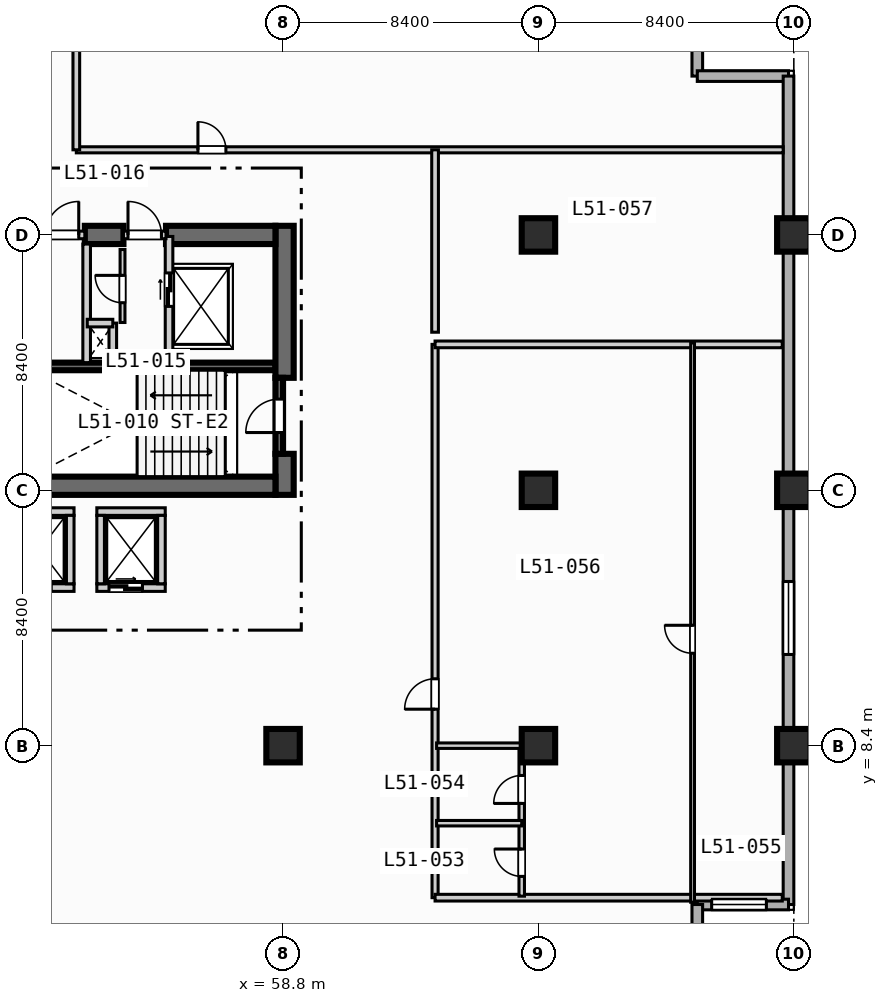
"""IFC4 building model, lengths in metres.
Left out: names, types, materials, properties, quantities, classifications, styles, units other than length and angle.
Written with IfcOpenShell. Run it as: python <this file> out.ifc"""

import sys

from ifc_helpers import new_model, si_unit, direction, frame, frame_2d, origin, origin_2d, place, context, subcontext, project, spatial, rectangle, extrude, element, fill, save


model = new_model("IFC4")
c1 = context("Model", 3, precision=1e-05, world=origin(), true_north=direction((0.0, 1.0)))
c2 = subcontext(c1, "Body", "Model", "MODEL_VIEW")
j1 = project(units=[si_unit("LENGTHUNIT", "METRE"), si_unit("PLANEANGLEUNIT", "RADIAN")], contexts=[c1])
p1 = place(None, origin())
s1 = spatial("IfcSite", under=j1, at=p1, CompositionType="ELEMENT")
p2 = place(p1, origin())
s2 = spatial("IfcBuilding", under=s1, at=p2, CompositionType="ELEMENT")
p3 = place(p2, frame((0.0, 0.0, 208.7)))
s3 = spatial("IfcBuildingStorey", under=s2, at=p3, CompositionType="ELEMENT", Elevation=208.7)
p4 = place(p3, frame((50.5, 20.875, 0.0), z_axis=(0.0, 0.0, 1.0), x_axis=(1.0, 0.0, 0.0)))
e1 = element("IfcWall", 1, at=p4, inside=s3, PredefinedType="SOLIDWALL", context=c2, shape_type="SweptSolid", body=[
    extrude(rectangle(XDim=8.05, YDim=0.25, at=frame_2d((4.025, 0.0))), origin(), (0.0, 0.0, 1.0), 3.47),
])
p5 = place(p3, frame((58.85, 16.65, 0.0), z_axis=(0.0, 0.0, 1.0), x_axis=(0.0, 1.0, 0.0)))
e2 = element("IfcWall", 2, at=p5, inside=s3, PredefinedType="SHEAR", context=c2, shape_type="SweptSolid", body=[
    extrude(rectangle(XDim=1.35, YDim=0.6, at=frame_2d((0.675, 0.0))), origin(), (0.0, 0.0, 1.0), 3.47),
])
p6 = place(p3, frame((58.85, 20.5, 0.0), z_axis=(0.0, 0.0, 1.0), x_axis=(0.0, 1.0, 0.0)))
e3 = element("IfcWall", 3, at=p6, inside=s3, PredefinedType="SHEAR", context=c2, shape_type="SweptSolid", body=[
    extrude(rectangle(XDim=5.0, YDim=0.6, at=frame_2d((2.5, 0.0))), origin(), (0.0, 0.0, 1.0), 3.47),
])
p7 = place(p3, frame((42.2, 16.95, 0.0), z_axis=(0.0, 0.0, 1.0), x_axis=(1.0, 0.0, 0.0)))
e4 = element("IfcWall", 4, at=p7, inside=s3, PredefinedType="SHEAR", context=c2, shape_type="SweptSolid", body=[
    extrude(rectangle(XDim=16.35, YDim=0.6, at=frame_2d((8.175, 0.0))), origin(), (0.0, 0.0, 1.0), 3.47),
])
p8 = place(p3, frame((52.28, 25.2, 0.0), z_axis=(0.0, 0.0, 1.0), x_axis=(1.0, 0.0, 0.0)))
e5 = element("IfcWall", 5, at=p8, inside=s3, PredefinedType="SHEAR", context=c2, shape_type="SweptSolid", body=[
    extrude(rectangle(XDim=1.27, YDim=0.6, at=frame_2d((0.635, 0.0))), origin(), (0.0, 0.0, 1.0), 3.47),
])
p9 = place(p3, frame((54.95, 25.2, 0.0), z_axis=(0.0, 0.0, 1.0), x_axis=(1.0, 0.0, 0.0)))
e6 = element("IfcWall", 6, at=p9, inside=s3, PredefinedType="SHEAR", context=c2, shape_type="SweptSolid", body=[
    extrude(rectangle(XDim=3.6, YDim=0.6, at=frame_2d((1.8, 0.0))), origin(), (0.0, 0.0, 1.0), 3.47),
])
for number, where, z_axis, x_axis in (
    (7, (58.8, 8.4, 0.0), (0.0, 0.0, 1.0), (1.0, 0.0, 0.0)),
    (8, (67.2, 8.4, 0.0), (0.0, 0.0, 1.0), (1.0, 0.0, 0.0)),
    (9, (67.2, 16.8, 0.0), (0.0, 0.0, 1.0), (1.0, 0.0, 0.0)),
    (10, (67.2, 25.2, 0.0), (0.0, 0.0, 1.0), (1.0, 0.0, 0.0)),
    (11, (75.6, 8.4, 0.0), (0.0, 0.0, 1.0), (1.0, 0.0, 0.0)),
    (12, (75.6, 16.8, 0.0), (0.0, 0.0, 1.0), (1.0, 0.0, 0.0)),
    (13, (75.6, 25.2, 0.0), (0.0, 0.0, 1.0), (1.0, 0.0, 0.0)),
):
    element("IfcColumn", number, at=place(p3, frame(where, z_axis=z_axis, x_axis=x_axis)), inside=s3, PredefinedType="COLUMN", context=c2, shape_type="SweptSolid", body=[
        extrude(rectangle(XDim=1.1, YDim=1.1, at=origin_2d()), origin(), (0.0, 0.0, 1.0), 3.7),
    ])
for number, where, z_axis, x_axis in (
    (14, (72.425, 33.425, 0.0), (0.0, 0.0, 1.0), (0.0, -1.0, 0.0)),
    (15, (72.425, 30.425, 0.0), (0.0, 0.0, 1.0), (1.0, 0.0, 0.0)),
):
    element("IfcWall", number, at=place(p3, frame(where, z_axis=z_axis, x_axis=x_axis)), inside=s3, PredefinedType="STANDARD", context=c2, shape_type="SweptSolid", body=[
        extrude(rectangle(XDim=3.0, YDim=0.35, at=frame_2d((1.5, 0.0))), origin(), (0.0, 0.0, 1.0), 3.47),
    ])
p10 = place(p3, frame((75.425, 30.425, 0.0), z_axis=(0.0, 0.0, 1.0), x_axis=(0.0, -1.0, 0.0)))
e16 = element("IfcWall", 16, at=p10, inside=s3, PredefinedType="STANDARD", context=c2, shape_type="SweptSolid", body=[
    extrude(rectangle(XDim=27.25, YDim=0.35, at=frame_2d((13.625, 0.0))), origin(), (0.0, 0.0, 1.0), 3.47),
])
p11 = place(p10, frame((16.625, 0.0, 0.85)))
e17 = element("IfcOpeningElement", 17, at=p11, cuts=e16, PredefinedType="OPENING", context=c2, shape_type="SweptSolid", body=[
    extrude(rectangle(XDim=2.4, YDim=1.95, at=frame_2d((1.2, 0.975))), frame((0.0, 0.185, 0.0), z_axis=(0.0, -1.0, 0.0), x_axis=(1.0, 0.0, 0.0)), (0.0, 0.0, 1.0), 0.37),
])
p12 = place(p3, frame((75.425, 3.175, 0.0), z_axis=(0.0, 0.0, 1.0), x_axis=(-1.0, 0.0, 0.0)))
e18 = element("IfcWall", 18, at=p12, inside=s3, PredefinedType="STANDARD", context=c2, shape_type="SweptSolid", body=[
    extrude(rectangle(XDim=3.0, YDim=0.35, at=frame_2d((1.5, 0.0))), origin(), (0.0, 0.0, 1.0), 3.47),
])
p13 = place(p12, frame((0.728, 0.0, 0.85)))
e19 = element("IfcOpeningElement", 19, at=p13, cuts=e18, PredefinedType="OPENING", context=c2, shape_type="SweptSolid", body=[
    extrude(rectangle(XDim=1.8, YDim=1.8, at=frame_2d((0.9, 0.9))), frame((0.0, 0.185, 0.0), z_axis=(0.0, -1.0, 0.0), x_axis=(1.0, 0.0, 0.0)), (0.0, 0.0, 1.0), 0.37),
])
p14 = place(p3, frame((72.425, 3.175, 0.0), z_axis=(0.0, 0.0, 1.0), x_axis=(0.0, -1.0, 0.0)))
e20 = element("IfcWall", 20, at=p14, inside=s3, PredefinedType="STANDARD", context=c2, shape_type="SweptSolid", body=[
    extrude(rectangle(XDim=3.0, YDim=0.35, at=frame_2d((1.5, 0.0))), origin(), (0.0, 0.0, 1.0), 3.47),
])
p15 = place(p3, frame((58.675, 18.0, 0.0), z_axis=(0.0, 0.0, 1.0), x_axis=(0.0, 1.0, 0.0)))
e21 = element("IfcWall", 21, at=p15, inside=s3, PredefinedType="SOLIDWALL", context=c2, shape_type="SweptSolid", body=[
    extrude(rectangle(XDim=2.5, YDim=0.25, at=frame_2d((1.25, 0.0))), origin(), (0.0, 0.0, 1.0), 3.47),
])
p16 = place(p15, frame((0.7, 0.0, 0.0)))
e22 = element("IfcOpeningElement", 22, at=p16, cuts=e21, PredefinedType="OPENING", context=c2, shape_type="SweptSolid", body=[
    extrude(rectangle(XDim=1.1, YDim=2.15, at=frame_2d((0.55, 1.075))), frame((0.0, 0.135, 0.0), z_axis=(0.0, -1.0, 0.0), x_axis=(1.0, 0.0, 0.0)), (0.0, 0.0, 1.0), 0.27),
])
p17 = place(p3, frame((50.8, 25.2, 0.0), z_axis=(0.0, 0.0, 1.0), x_axis=(1.0, 0.0, 0.0)))
e23 = element("IfcWall", 23, at=p17, inside=s3, PredefinedType="SOLIDWALL", context=c2, shape_type="SweptSolid", body=[
    extrude(rectangle(XDim=1.48, YDim=0.25, at=frame_2d((0.74, 0.0))), origin(), (0.0, 0.0, 1.0), 3.47),
])
p18 = place(p17, frame((0.18, 0.0, 0.0)))
e24 = element("IfcOpeningElement", 24, at=p18, cuts=e23, PredefinedType="OPENING", context=c2, shape_type="SweptSolid", body=[
    extrude(rectangle(XDim=1.1, YDim=2.15, at=frame_2d((0.55, 1.075))), frame((0.0, 0.135, 0.0), z_axis=(0.0, -1.0, 0.0), x_axis=(1.0, 0.0, 0.0)), (0.0, 0.0, 1.0), 0.27),
])
p19 = place(p3, frame((52.34, 21.0, 0.0), z_axis=(0.0, 0.0, 1.0), x_axis=(0.0, 1.0, 0.0)))
e25 = element("IfcWall", 25, at=p19, inside=s3, PredefinedType="SOLIDWALL", context=c2, shape_type="SweptSolid", body=[
    extrude(rectangle(XDim=3.9, YDim=0.25, at=frame_2d((1.95, 0.0))), origin(), (0.0, 0.0, 1.0), 3.47),
])
p20 = place(p3, frame((55.05, 21.0, 0.0), z_axis=(0.0, 0.0, 1.0), x_axis=(0.0, 1.0, 0.0)))
e26 = element("IfcWall", 26, at=p20, inside=s3, PredefinedType="SOLIDWALL", context=c2, shape_type="SweptSolid", body=[
    extrude(rectangle(XDim=4.15, YDim=0.25, at=frame_2d((2.075, 0.0))), origin(), (0.0, 0.0, 1.0), 3.47),
])
p21 = place(p20, frame((1.85, 0.0, 0.0)))
e27 = element("IfcOpeningElement", 27, at=p21, cuts=e26, PredefinedType="OPENING", context=c2, shape_type="SweptSolid", body=[
    extrude(rectangle(XDim=1.1, YDim=2.15, at=frame_2d((0.55, 1.075))), frame((0.0, 0.135, 0.0), z_axis=(0.0, -1.0, 0.0), x_axis=(1.0, 0.0, 0.0)), (0.0, 0.0, 1.0), 0.27),
])
p22 = place(p3, frame((53.55, 25.2, 0.0), z_axis=(0.0, 0.0, 1.0), x_axis=(1.0, 0.0, 0.0)))
e28 = element("IfcWall", 28, at=p22, inside=s3, PredefinedType="SOLIDWALL", context=c2, shape_type="SweptSolid", body=[
    extrude(rectangle(XDim=1.4, YDim=0.25, at=frame_2d((0.7, 0.0))), origin(), (0.0, 0.0, 1.0), 3.47),
])
p23 = place(p22, frame((0.15, 0.0, 0.0)))
e29 = element("IfcOpeningElement", 29, at=p23, cuts=e28, PredefinedType="OPENING", context=c2, shape_type="SweptSolid", body=[
    extrude(rectangle(XDim=1.1, YDim=2.15, at=frame_2d((0.55, 1.075))), frame((0.0, 0.135, 0.0), z_axis=(0.0, -1.0, 0.0), x_axis=(1.0, 0.0, 0.0)), (0.0, 0.0, 1.0), 0.27),
])
p24 = place(p3, frame((53.2, 21.0, 0.0), z_axis=(0.0, 0.0, 1.0), x_axis=(0.0, 1.0, 0.0)))
e30 = element("IfcWall", 30, at=p24, inside=s3, PredefinedType="SOLIDWALL", context=c2, shape_type="SweptSolid", body=[
    extrude(rectangle(XDim=1.3, YDim=0.25, at=frame_2d((0.65, 0.0))), origin(), (0.0, 0.0, 1.0), 3.47),
])
p25 = place(p3, frame((52.36, 22.3, 0.0), z_axis=(0.0, 0.0, 1.0), x_axis=(1.0, 0.0, 0.0)))
e31 = element("IfcWall", 31, at=p25, inside=s3, PredefinedType="SOLIDWALL", context=c2, shape_type="SweptSolid", body=[
    extrude(rectangle(XDim=0.84, YDim=0.25, at=frame_2d((0.42, 0.0))), origin(), (0.0, 0.0, 1.0), 3.47),
])
p26 = place(p3, frame((53.52, 22.32, 0.0), z_axis=(0.0, 0.0, 1.0), x_axis=(0.0, 1.0, 0.0)))
e32 = element("IfcWall", 32, at=p26, inside=s3, PredefinedType="PARTITIONING", context=c2, shape_type="SweptSolid", body=[
    extrude(rectangle(XDim=2.4, YDim=0.16, at=frame_2d((1.2, 0.0))), origin(), (0.0, 0.0, 1.0), 3.47),
])
p27 = place(p26, frame((0.65, 0.0, 0.0)))
e33 = element("IfcOpeningElement", 33, at=p27, cuts=e32, PredefinedType="OPENING", context=c2, shape_type="SweptSolid", body=[
    extrude(rectangle(XDim=0.9, YDim=2.1, at=frame_2d((0.45, 1.05))), frame((0.0, 0.09, 0.0), z_axis=(0.0, -1.0, 0.0), x_axis=(1.0, 0.0, 0.0)), (0.0, 0.0, 1.0), 0.18),
])
p28 = place(p3, frame((49.675, 13.6, 0.0), z_axis=(0.0, 0.0, 1.0), x_axis=(1.0, 0.0, 0.0)))
e34 = element("IfcWall", 34, at=p28, inside=s3, PredefinedType="SOLIDWALL", context=c2, shape_type="SweptSolid", body=[
    extrude(rectangle(XDim=2.25, YDim=0.25, at=frame_2d((1.125, 0.0))), origin(), (0.0, 0.0, 1.0), 3.47),
])
p29 = place(p28, frame((0.4, 0.0, 0.0)))
e35 = element("IfcOpeningElement", 35, at=p29, cuts=e34, PredefinedType="OPENING", context=c2, shape_type="SweptSolid", body=[
    extrude(rectangle(XDim=1.1, YDim=2.15, at=frame_2d((0.55, 1.075))), frame((0.0, 0.135, 0.0), z_axis=(0.0, -1.0, 0.0), x_axis=(1.0, 0.0, 0.0)), (0.0, 0.0, 1.0), 0.27),
])
for number, where, z_axis, x_axis in (
    (36, (49.675, 16.1, 0.0), (0.0, 0.0, 1.0), (1.0, 0.0, 0.0)),
    (37, (51.8, 13.725, 0.0), (0.0, 0.0, 1.0), (0.0, 1.0, 0.0)),
):
    element("IfcWall", number, at=place(p3, frame(where, z_axis=z_axis, x_axis=x_axis)), inside=s3, PredefinedType="SOLIDWALL", context=c2, shape_type="SweptSolid", body=[
        extrude(rectangle(XDim=2.25, YDim=0.25, at=frame_2d((1.125, 0.0))), origin(), (0.0, 0.0, 1.0), 3.47),
    ])
p30 = place(p3, frame((52.675, 13.6, 0.0), z_axis=(0.0, 0.0, 1.0), x_axis=(1.0, 0.0, 0.0)))
e38 = element("IfcWall", 38, at=p30, inside=s3, PredefinedType="SOLIDWALL", context=c2, shape_type="SweptSolid", body=[
    extrude(rectangle(XDim=2.25, YDim=0.25, at=frame_2d((1.125, 0.0))), origin(), (0.0, 0.0, 1.0), 3.47),
])
p31 = place(p30, frame((0.4, 0.0, 0.0)))
e39 = element("IfcOpeningElement", 39, at=p31, cuts=e38, PredefinedType="OPENING", context=c2, shape_type="SweptSolid", body=[
    extrude(rectangle(XDim=1.1, YDim=2.15, at=frame_2d((0.55, 1.075))), frame((0.0, 0.135, 0.0), z_axis=(0.0, -1.0, 0.0), x_axis=(1.0, 0.0, 0.0)), (0.0, 0.0, 1.0), 0.27),
])
for number, where, z_axis, x_axis in (
    (40, (52.675, 16.1, 0.0), (0.0, 0.0, 1.0), (1.0, 0.0, 0.0)),
    (41, (52.8, 13.725, 0.0), (0.0, 0.0, 1.0), (0.0, 1.0, 0.0)),
    (42, (54.8, 13.725, 0.0), (0.0, 0.0, 1.0), (0.0, 1.0, 0.0)),
):
    element("IfcWall", number, at=place(p3, frame(where, z_axis=z_axis, x_axis=x_axis)), inside=s3, PredefinedType="SOLIDWALL", context=c2, shape_type="SweptSolid", body=[
        extrude(rectangle(XDim=2.25, YDim=0.25, at=frame_2d((1.125, 0.0))), origin(), (0.0, 0.0, 1.0), 3.47),
    ])
p32 = place(p3, frame((63.8, 3.4, 0.0), z_axis=(0.0, 0.0, 1.0), x_axis=(0.0, 1.0, 0.0)))
e43 = element("IfcWall", 43, at=p32, inside=s3, PredefinedType="PARTITIONING", context=c2, shape_type="SweptSolid", body=[
    extrude(rectangle(XDim=18.2, YDim=0.2, at=frame_2d((9.1, 0.0))), origin(), (0.0, 0.0, 1.0), 3.47),
])
p33 = place(p32, frame((6.2, 0.0, 0.0)))
e44 = element("IfcOpeningElement", 44, at=p33, cuts=e43, PredefinedType="OPENING", context=c2, shape_type="SweptSolid", body=[
    extrude(rectangle(XDim=1.0, YDim=2.15, at=frame_2d((0.5, 1.075))), frame((0.0, 0.11, 0.0), z_axis=(0.0, -1.0, 0.0), x_axis=(1.0, 0.0, 0.0)), (0.0, 0.0, 1.0), 0.22),
])
for number, where, z_axis, x_axis in (
    (45, (63.8, 3.4, 0.0), (0.0, 0.0, 1.0), (1.0, 0.0, 0.0)),
    (46, (63.8, 21.6, 0.0), (0.0, 0.0, 1.0), (1.0, 0.0, 0.0)),
):
    element("IfcWall", number, at=place(p3, frame(where, z_axis=z_axis, x_axis=x_axis)), inside=s3, PredefinedType="PARTITIONING", context=c2, shape_type="SweptSolid", body=[
        extrude(rectangle(XDim=11.42, YDim=0.22, at=frame_2d((5.71, 0.0))), origin(), (0.0, 0.0, 1.0), 3.47),
    ])
p34 = place(p3, frame((66.65, 3.45, 0.0), z_axis=(0.0, 0.0, 1.0), x_axis=(0.0, 1.0, 0.0)))
e47 = element("IfcWall", 47, at=p34, inside=s3, PredefinedType="PLUMBINGWALL", context=c2, shape_type="SweptSolid", body=[
    extrude(rectangle(XDim=4.95, YDim=0.18, at=frame_2d((2.475, 0.0))), origin(), (0.0, 0.0, 1.0), 3.47),
])
p35 = place(p34, frame((0.65, 0.0, 0.0)))
e48 = element("IfcOpeningElement", 48, at=p35, cuts=e47, PredefinedType="OPENING", context=c2, shape_type="SweptSolid", body=[
    extrude(rectangle(XDim=0.9, YDim=2.1, at=frame_2d((0.45, 1.05))), frame((0.0, 0.1, 0.0), z_axis=(0.0, -1.0, 0.0), x_axis=(1.0, 0.0, 0.0)), (0.0, 0.0, 1.0), 0.2),
])
p36 = place(p34, frame((3.05, 0.0, 0.0)))
e49 = element("IfcOpeningElement", 49, at=p36, cuts=e47, PredefinedType="OPENING", context=c2, shape_type="SweptSolid", body=[
    extrude(rectangle(XDim=0.92, YDim=2.1, at=frame_2d((0.46, 1.05))), frame((0.0, 0.1, 0.0), z_axis=(0.0, -1.0, 0.0), x_axis=(1.0, 0.0, 0.0)), (0.0, 0.0, 1.0), 0.2),
])
p37 = place(p3, frame((63.85, 5.85, 0.0), z_axis=(0.0, 0.0, 1.0), x_axis=(1.0, 0.0, 0.0)))
e50 = element("IfcWall", 50, at=p37, inside=s3, PredefinedType="PLUMBINGWALL", context=c2, shape_type="SweptSolid", body=[
    extrude(rectangle(XDim=2.8, YDim=0.18, at=frame_2d((1.4, 0.0))), origin(), (0.0, 0.0, 1.0), 3.47),
])
p38 = place(p3, frame((63.85, 8.4, 0.0), z_axis=(0.0, 0.0, 1.0), x_axis=(1.0, 0.0, 0.0)))
e51 = element("IfcWall", 51, at=p38, inside=s3, PredefinedType="PLUMBINGWALL", context=c2, shape_type="SweptSolid", body=[
    extrude(rectangle(XDim=2.8, YDim=0.18, at=frame_2d((1.4, 0.0))), origin(), (0.0, 0.0, 1.0), 2.927),
])
p39 = place(p3, frame((72.27, 3.25, 0.0), z_axis=(0.0, 0.0, 1.0), x_axis=(0.0, 1.0, 0.0)))
e52 = element("IfcWall", 52, at=p39, inside=s3, PredefinedType="PARTITIONING", context=c2, shape_type="SweptSolid", body=[
    extrude(rectangle(XDim=18.4, YDim=0.125, at=frame_2d((9.2, 0.0))), origin(), (0.0, 0.0, 1.0), 3.47),
])
p40 = place(p39, frame((8.19, 0.0, 0.0)))
e53 = element("IfcOpeningElement", 53, at=p40, cuts=e52, PredefinedType="OPENING", context=c2, shape_type="SweptSolid", body=[
    extrude(rectangle(XDim=0.92, YDim=2.1, at=frame_2d((0.46, 1.05))), frame((0.0, 0.073, 0.0), z_axis=(0.0, -1.0, 0.0), x_axis=(1.0, 0.0, 0.0)), (0.0, 0.0, 1.0), 0.145),
])
p41 = place(p3, frame((52.0, 28.0, 0.0), z_axis=(0.0, 0.0, 1.0), x_axis=(1.0, 0.0, 0.0)))
e54 = element("IfcWall", 54, at=p41, inside=s3, PredefinedType="PARTITIONING", context=c2, shape_type="SweptSolid", body=[
    extrude(rectangle(XDim=23.25, YDim=0.2, at=frame_2d((11.625, 0.0))), origin(), (0.0, 0.0, 1.0), 3.47),
])
p42 = place(p41, frame((4.0, 0.0, 0.0)))
e55 = element("IfcOpeningElement", 55, at=p42, cuts=e54, PredefinedType="OPENING", context=c2, shape_type="SweptSolid", body=[
    extrude(rectangle(XDim=0.92, YDim=2.1, at=frame_2d((0.46, 1.05))), frame((0.0, 0.11, 0.0), z_axis=(0.0, -1.0, 0.0), x_axis=(1.0, 0.0, 0.0)), (0.0, 0.0, 1.0), 0.22),
])
p43 = place(p3, frame((52.0, 28.0, 0.0), z_axis=(0.0, 0.0, 1.0), x_axis=(0.0, 1.0, 0.0)))
e56 = element("IfcWall", 56, at=p43, inside=s3, PredefinedType="PARTITIONING", context=c2, shape_type="SweptSolid", body=[
    extrude(rectangle(XDim=5.3, YDim=0.22, at=frame_2d((2.65, 0.0))), origin(), (0.0, 0.0, 1.0), 3.47),
])
p44 = place(p3, frame((63.8, 22.0, 0.0), z_axis=(0.0, 0.0, 1.0), x_axis=(0.0, 1.0, 0.0)))
e57 = element("IfcWall", 57, at=p44, inside=s3, PredefinedType="PARTITIONING", context=c2, shape_type="SweptSolid", body=[
    extrude(rectangle(XDim=6.0, YDim=0.22, at=frame_2d((3.0, 0.0))), origin(), (0.0, 0.0, 1.0), 3.47),
])
p45 = place(p11, origin())
e58 = element("IfcWindow", 58, at=p45, inside=s3, PartitioningType="SINGLE_PANEL", PredefinedType="WINDOW", context=c2, shape_type="SweptSolid", body=[
    extrude(rectangle(XDim=2.4, YDim=1.95, at=frame_2d((1.2, 0.975))), frame((0.0, 0.03, 0.0), z_axis=(0.0, -1.0, 0.0), x_axis=(1.0, 0.0, 0.0)), (0.0, 0.0, 1.0), 0.06),
])
fill(e17, e58)
p46 = place(p13, origin())
e59 = element("IfcWindow", 59, at=p46, inside=s3, PartitioningType="SINGLE_PANEL", PredefinedType="WINDOW", context=c2, shape_type="SweptSolid", body=[
    extrude(rectangle(XDim=1.8, YDim=1.8, at=frame_2d((0.9, 0.9))), frame((0.0, 0.03, 0.0), z_axis=(0.0, -1.0, 0.0), x_axis=(1.0, 0.0, 0.0)), (0.0, 0.0, 1.0), 0.06),
])
fill(e19, e59)
p47 = place(p16, origin())
e60 = element("IfcDoor", 60, at=p47, inside=s3, OperationType="SINGLE_SWING_LEFT", PredefinedType="DOOR", context=c2, shape_type="SweptSolid", body=[
    extrude(rectangle(XDim=1.1, YDim=2.15, at=frame_2d((0.55, 1.075))), frame((0.0, 0.025, 0.0), z_axis=(0.0, -1.0, 0.0), x_axis=(1.0, 0.0, 0.0)), (0.0, 0.0, 1.0), 0.05),
])
fill(e22, e60)
p48 = place(p18, origin())
e61 = element("IfcDoor", 61, at=p48, inside=s3, OperationType="SINGLE_SWING_RIGHT", PredefinedType="DOOR", context=c2, shape_type="SweptSolid", body=[
    extrude(rectangle(XDim=1.1, YDim=2.15, at=frame_2d((0.55, 1.075))), frame((0.0, 0.025, 0.0), z_axis=(0.0, -1.0, 0.0), x_axis=(1.0, 0.0, 0.0)), (0.0, 0.0, 1.0), 0.05),
])
fill(e24, e61)
p49 = place(p21, origin())
e62 = element("IfcDoor", 62, at=p49, inside=s3, OperationType="SLIDING_TO_LEFT", PredefinedType="DOOR", context=c2, shape_type="SweptSolid", body=[
    extrude(rectangle(XDim=1.1, YDim=2.15, at=frame_2d((0.55, 1.075))), frame((0.0, 0.025, 0.0), z_axis=(0.0, -1.0, 0.0), x_axis=(1.0, 0.0, 0.0)), (0.0, 0.0, 1.0), 0.05),
])
fill(e27, e62)
p50 = place(p23, origin())
e63 = element("IfcDoor", 63, at=p50, inside=s3, OperationType="SINGLE_SWING_LEFT", PredefinedType="DOOR", context=c2, shape_type="SweptSolid", body=[
    extrude(rectangle(XDim=1.1, YDim=2.15, at=frame_2d((0.55, 1.075))), frame((0.0, 0.025, 0.0), z_axis=(0.0, -1.0, 0.0), x_axis=(1.0, 0.0, 0.0)), (0.0, 0.0, 1.0), 0.05),
])
fill(e29, e63)
p51 = place(p27, origin())
e64 = element("IfcDoor", 64, at=p51, inside=s3, OperationType="SINGLE_SWING_RIGHT", PredefinedType="DOOR", context=c2, shape_type="SweptSolid", body=[
    extrude(rectangle(XDim=0.9, YDim=2.1, at=frame_2d((0.45, 1.05))), frame((0.0, 0.025, 0.0), z_axis=(0.0, -1.0, 0.0), x_axis=(1.0, 0.0, 0.0)), (0.0, 0.0, 1.0), 0.05),
])
fill(e33, e64)
p52 = place(p31, origin())
e65 = element("IfcDoor", 65, at=p52, inside=s3, OperationType="SLIDING_TO_LEFT", PredefinedType="DOOR", context=c2, shape_type="SweptSolid", body=[
    extrude(rectangle(XDim=1.1, YDim=2.15, at=frame_2d((0.55, 1.075))), frame((0.0, 0.025, 0.0), z_axis=(0.0, -1.0, 0.0), x_axis=(1.0, 0.0, 0.0)), (0.0, 0.0, 1.0), 0.05),
])
fill(e39, e65)
p53 = place(p33, origin())
e66 = element("IfcDoor", 66, at=p53, inside=s3, OperationType="SINGLE_SWING_LEFT", PredefinedType="DOOR", context=c2, shape_type="SweptSolid", body=[
    extrude(rectangle(XDim=1.0, YDim=2.15, at=frame_2d((0.5, 1.075))), frame((0.0, 0.025, 0.0), z_axis=(0.0, -1.0, 0.0), x_axis=(1.0, 0.0, 0.0)), (0.0, 0.0, 1.0), 0.05),
])
fill(e44, e66)
p54 = place(p35, origin())
e67 = element("IfcDoor", 67, at=p54, inside=s3, OperationType="SINGLE_SWING_RIGHT", PredefinedType="DOOR", context=c2, shape_type="SweptSolid", body=[
    extrude(rectangle(XDim=0.9, YDim=2.1, at=frame_2d((0.45, 1.05))), frame((0.0, 0.025, 0.0), z_axis=(0.0, -1.0, 0.0), x_axis=(1.0, 0.0, 0.0)), (0.0, 0.0, 1.0), 0.05),
])
fill(e48, e67)
p55 = place(p36, origin())
e68 = element("IfcDoor", 68, at=p55, inside=s3, OperationType="SINGLE_SWING_LEFT", PredefinedType="DOOR", context=c2, shape_type="SweptSolid", body=[
    extrude(rectangle(XDim=0.92, YDim=2.1, at=frame_2d((0.46, 1.05))), frame((0.0, 0.025, 0.0), z_axis=(0.0, -1.0, 0.0), x_axis=(1.0, 0.0, 0.0)), (0.0, 0.0, 1.0), 0.05),
])
fill(e49, e68)
p56 = place(p40, origin())
e69 = element("IfcDoor", 69, at=p56, inside=s3, OperationType="SINGLE_SWING_RIGHT", PredefinedType="DOOR", context=c2, shape_type="SweptSolid", body=[
    extrude(rectangle(XDim=0.92, YDim=2.1, at=frame_2d((0.46, 1.05))), frame((0.0, 0.025, 0.0), z_axis=(0.0, -1.0, 0.0), x_axis=(1.0, 0.0, 0.0)), (0.0, 0.0, 1.0), 0.05),
])
fill(e53, e69)
p57 = place(p42, origin())
e70 = element("IfcDoor", 70, at=p57, inside=s3, OperationType="SINGLE_SWING_LEFT", PredefinedType="DOOR", context=c2, shape_type="SweptSolid", body=[
    extrude(rectangle(XDim=0.92, YDim=2.1, at=frame_2d((0.46, 1.05))), frame((0.0, 0.025, 0.0), z_axis=(0.0, -1.0, 0.0), x_axis=(1.0, 0.0, 0.0)), (0.0, 0.0, 1.0), 0.05),
])
fill(e55, e70)
save(model, sys.argv[1])
